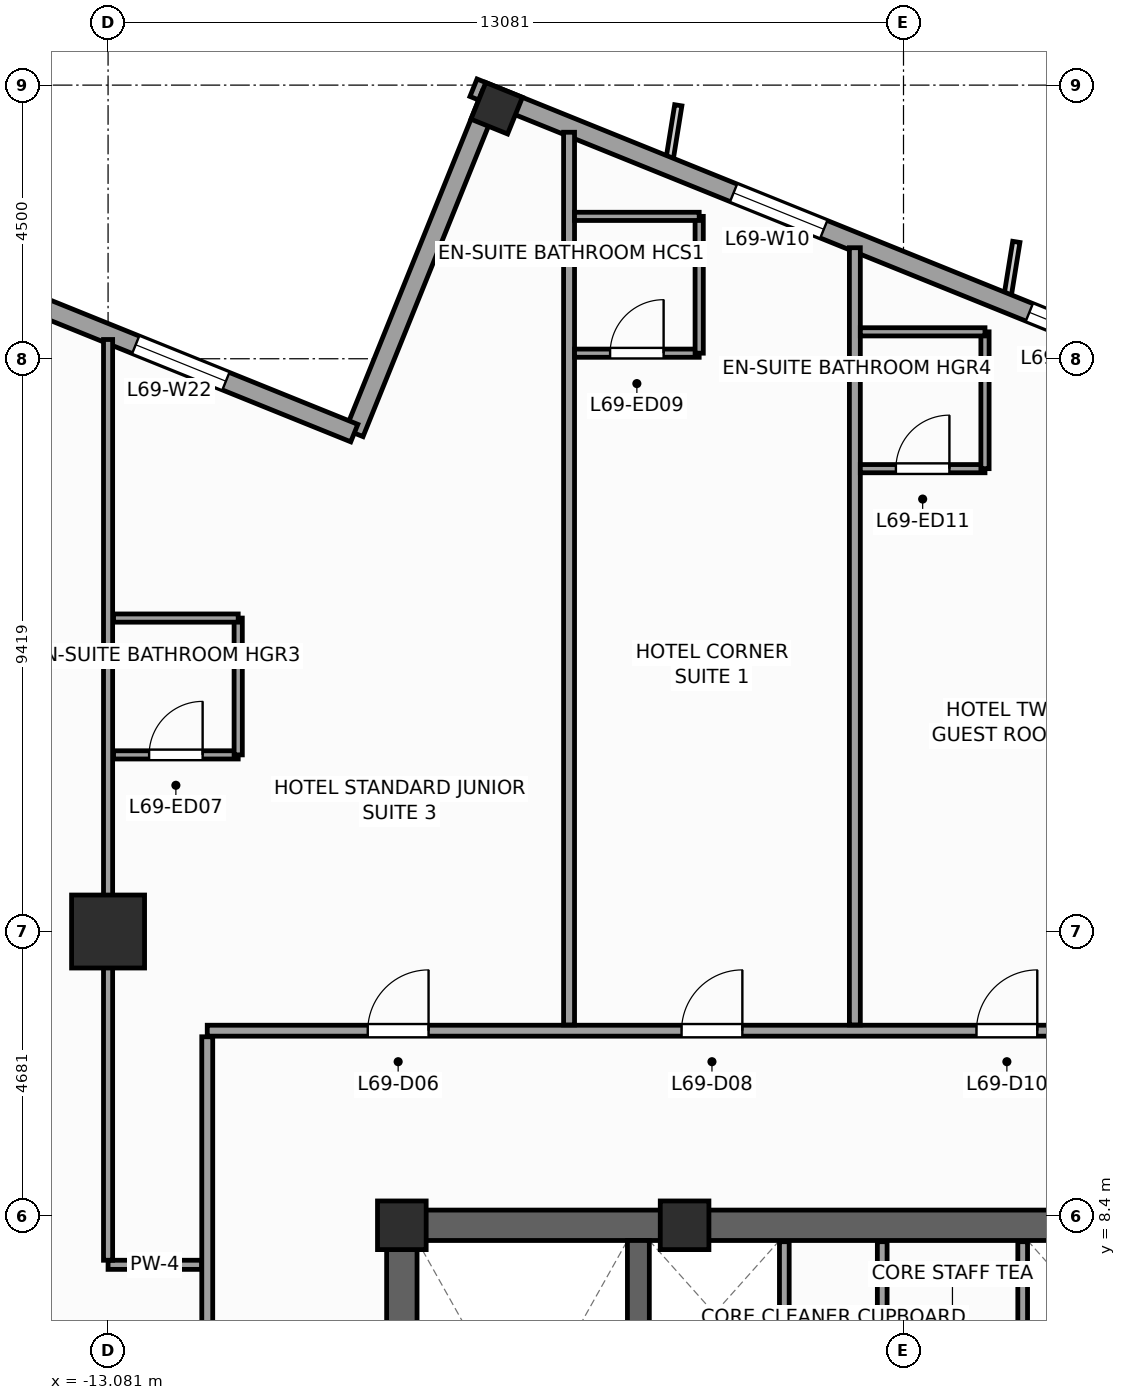
"""IFC4 building model, lengths in metres.
Left out: names, types, materials, properties, quantities, classifications, styles, units other than length and angle.
Written with IfcOpenShell. Run it as: python <this file> out.ifc"""

import sys

from ifc_helpers import new_model, si_unit, direction, frame, frame_2d, origin, origin_2d, place, context, subcontext, project, spatial, rectangle, extrude, source, transform, mapped, element, fill, save


model = new_model("IFC4")
c1 = context("Model", 3, precision=1e-05, world=origin(), true_north=direction((0.0, 1.0)))
c2 = subcontext(c1, "Body", "Model", "MODEL_VIEW")
j1 = project(units=[si_unit("LENGTHUNIT", "METRE"), si_unit("PLANEANGLEUNIT", "RADIAN")], contexts=[c1])
p1 = place(None, origin())
s1 = spatial("IfcSite", under=j1, at=p1, CompositionType="ELEMENT")
p2 = place(p1, origin())
s2 = spatial("IfcBuilding", under=s1, at=p2, CompositionType="ELEMENT")
p3 = place(p2, frame((0.0, 0.0, 283.2)))
s3 = spatial("IfcBuildingStorey", under=s2, at=p3, CompositionType="ELEMENT", Elevation=283.2)
p4 = place(p3, frame((-8.5, 8.25, 0.0), z_axis=(0.0, 0.0, 1.0), x_axis=(1.0, 0.0, 0.0)))
e1 = element("IfcWall", 1, at=p4, inside=s3, PredefinedType="SHEAR", context=c2, shape_type="SweptSolid", body=[
    extrude(rectangle(XDim=17.0, YDim=0.5, at=frame_2d((8.5, 0.0))), origin(), (0.0, 0.0, 1.0), 3.6),
])
p5 = place(p3, frame((-8.25, -8.0, 0.0), z_axis=(0.0, 0.0, 1.0), x_axis=(0.0, 1.0, 0.0)))
e2 = element("IfcWall", 2, at=p5, inside=s3, PredefinedType="SHEAR", context=c2, shape_type="SweptSolid", body=[
    extrude(rectangle(XDim=16.0, YDim=0.5, at=frame_2d((8.0, 0.0))), origin(), (0.0, 0.0, 1.0), 3.6),
])
p6 = place(p5, frame((4.69, 0.0, 0.0)))
e3 = element("IfcOpeningElement", 3, at=p6, cuts=e2, PredefinedType="OPENING", context=c2, shape_type="SweptSolid", body=[
    extrude(rectangle(XDim=1.3, YDim=2.2, at=frame_2d((0.65, 1.1))), frame((0.0, 0.26, 0.0), z_axis=(0.0, -1.0, 0.0), x_axis=(1.0, 0.0, 0.0)), (0.0, 0.0, 1.0), 0.52),
])
p7 = place(p3, frame((-4.36, -8.0, 0.0), z_axis=(0.0, 0.0, 1.0), x_axis=(0.0, 1.0, 0.0)))
e4 = element("IfcWall", 4, at=p7, inside=s3, PredefinedType="SHEAR", context=c2, shape_type="SweptSolid", body=[
    extrude(rectangle(XDim=16.0, YDim=0.36, at=frame_2d((8.0, 0.0))), origin(), (0.0, 0.0, 1.0), 3.6),
])
m1 = source(origin(), c2, "Body", "SweptSolid", [
    extrude(rectangle(XDim=0.8, YDim=0.8, at=origin_2d()), origin(), (0.0, 0.0, 1.0), 3.6),
])
for number, where, z_axis, x_axis in (
    (5, (-8.25, 8.25, 0.0), (0.0, 0.0, 1.0), (1.0, 0.0, 0.0)),
    (6, (-3.6, 8.25, 0.0), (0.0, 0.0, 1.0), (1.0, 0.0, 0.0)),
):
    element("IfcColumn", number, at=place(p3, frame(where, z_axis=z_axis, x_axis=x_axis)), inside=s3, PredefinedType="PILASTER", context=c2, shape_type="MappedRepresentation", body=[
        mapped(m1, transform((0.0, 0.0, 0.0), scale=1.0)),
    ])
m2 = source(origin(), c2, "Body", "SweptSolid", [
    extrude(rectangle(XDim=1.2, YDim=1.2, at=origin_2d()), origin(), (0.0, 0.0, 1.0), 3.6),
])
p8 = place(p3, frame((-13.081, 13.081, 0.0), z_axis=(0.0, 0.0, 1.0), x_axis=(1.0, 0.0, 0.0)))
e7 = element("IfcColumn", 7, at=p8, inside=s3, PredefinedType="COLUMN", context=c2, shape_type="MappedRepresentation", body=[
    mapped(m2, transform((0.0, 0.0, 0.0), scale=1.0)),
])
m3 = source(origin(), c2, "Body", "SweptSolid", [
    extrude(rectangle(XDim=0.65, YDim=0.65, at=origin_2d()), origin(), (0.0, 0.0, 1.0), 3.6),
])
p9 = place(p3, frame((-6.69, 26.62, 0.0), z_axis=(0.0, 0.0, 1.0), x_axis=(0.374606593416, 0.927183854567, 0.0)))
e8 = element("IfcColumn", 8, at=p9, inside=s3, PredefinedType="COLUMN", context=c2, shape_type="MappedRepresentation", body=[
    mapped(m3, transform((0.0, 0.0, 0.0), scale=1.0)),
])
p10 = place(p3, frame((23.813, 14.479, 0.0), z_axis=(0.0, 0.0, 1.0), x_axis=(-0.927182657188, 0.374609557019, 0.0)))
e9 = element("IfcWall", 9, at=p10, inside=s3, PredefinedType="STANDARD", context=c2, shape_type="SweptSolid", body=[
    extrude(rectangle(XDim=33.31, YDim=0.31, at=frame_2d((16.655, 0.0))), origin(), (0.0, 0.0, 1.0), 2.75),
])
p11 = place(p10, frame((3.197, 0.0, 0.47)))
e10 = element("IfcOpeningElement", 10, at=p11, cuts=e9, PredefinedType="OPENING", context=c2, shape_type="SweptSolid", body=[
    extrude(rectangle(XDim=1.6, YDim=2.1, at=frame_2d((0.8, 1.05))), frame((0.0, 0.165, 0.0), z_axis=(0.0, -1.0, 0.0), x_axis=(1.0, 0.0, 0.0)), (0.0, 0.0, 1.0), 0.33),
])
p12 = place(p10, frame((8.86, 0.0, 0.47)))
e11 = element("IfcOpeningElement", 11, at=p12, cuts=e9, PredefinedType="OPENING", context=c2, shape_type="SweptSolid", body=[
    extrude(rectangle(XDim=1.6, YDim=2.1, at=frame_2d((0.8, 1.05))), frame((0.0, 0.165, 0.0), z_axis=(0.0, -1.0, 0.0), x_axis=(1.0, 0.0, 0.0)), (0.0, 0.0, 1.0), 0.33),
])
p13 = place(p10, frame((14.439, 0.0, 0.47)))
e12 = element("IfcOpeningElement", 12, at=p13, cuts=e9, PredefinedType="OPENING", context=c2, shape_type="SweptSolid", body=[
    extrude(rectangle(XDim=1.6, YDim=2.1, at=frame_2d((0.8, 1.05))), frame((0.0, 0.165, 0.0), z_axis=(0.0, -1.0, 0.0), x_axis=(1.0, 0.0, 0.0)), (0.0, 0.0, 1.0), 0.33),
])
p14 = place(p10, frame((21.851, 0.0, 0.47)))
e13 = element("IfcOpeningElement", 13, at=p14, cuts=e9, PredefinedType="OPENING", context=c2, shape_type="SweptSolid", body=[
    extrude(rectangle(XDim=1.6, YDim=2.1, at=frame_2d((0.8, 1.05))), frame((0.0, 0.165, 0.0), z_axis=(0.0, -1.0, 0.0), x_axis=(1.0, 0.0, 0.0)), (0.0, 0.0, 1.0), 0.33),
])
p15 = place(p10, frame((27.097, 0.0, 0.47)))
e14 = element("IfcOpeningElement", 14, at=p15, cuts=e9, PredefinedType="OPENING", context=c2, shape_type="SweptSolid", body=[
    extrude(rectangle(XDim=1.6, YDim=2.1, at=frame_2d((0.8, 1.05))), frame((0.0, 0.165, 0.0), z_axis=(0.0, -1.0, 0.0), x_axis=(1.0, 0.0, 0.0)), (0.0, 0.0, 1.0), 0.33),
])
p16 = place(p3, frame((-6.784, 26.841, 0.0), z_axis=(0.0, 0.0, 1.0), x_axis=(-0.374636620962, -0.927171722085, 0.0)))
e15 = element("IfcWall", 15, at=p16, inside=s3, PredefinedType="STANDARD", context=c2, shape_type="SweptSolid", body=[
    extrude(rectangle(XDim=6.0, YDim=0.31, at=frame_2d((3.0, 0.0))), origin(), (0.0, 0.0, 1.0), 2.65),
])
p17 = place(p3, frame((-9.032, 21.278, 0.0), z_axis=(0.0, 0.0, 1.0), x_axis=(-0.927185411764, 0.374602739196, 0.0)))
e16 = element("IfcWall", 16, at=p17, inside=s3, PredefinedType="STANDARD", context=c2, shape_type="SweptSolid", body=[
    extrude(rectangle(XDim=6.155, YDim=0.31, at=frame_2d((3.078, 0.0))), origin(), (0.0, 0.0, 1.0), 3.35),
])
p18 = place(p17, frame((2.278, 0.0, 0.47)))
e17 = element("IfcOpeningElement", 17, at=p18, cuts=e16, PredefinedType="OPENING", context=c2, shape_type="SweptSolid", body=[
    extrude(rectangle(XDim=1.6, YDim=2.1, at=frame_2d((0.8, 1.05))), frame((0.0, 0.165, 0.0), z_axis=(0.0, -1.0, 0.0), x_axis=(1.0, 0.0, 0.0)), (0.0, 0.0, 1.0), 0.33),
])
for number, where, z_axis, x_axis in (
    (18, (-1.96, 4.58, 0.0), (0.0, 0.0, 1.0), (0.0, 1.0, 0.0)),
    (19, (1.96, 4.58, 0.0), (0.0, 0.0, 1.0), (0.0, 1.0, 0.0)),
):
    element("IfcWall", number, at=place(p3, frame(where, z_axis=z_axis, x_axis=x_axis)), inside=s3, PredefinedType="PARTITIONING", context=c2, shape_type="SweptSolid", body=[
        extrude(rectangle(XDim=3.4, YDim=0.16, at=frame_2d((1.7, 0.0))), origin(), (0.0, 0.0, 1.0), 3.35),
    ])
p19 = place(p3, frame((-0.35, 4.6, 0.0), z_axis=(0.0, 0.0, 1.0), x_axis=(0.0, 1.0, 0.0)))
e20 = element("IfcWall", 20, at=p19, inside=s3, PredefinedType="PARTITIONING", context=c2, shape_type="SweptSolid", body=[
    extrude(rectangle(XDim=3.38, YDim=0.16, at=frame_2d((1.69, 0.0))), origin(), (0.0, 0.0, 1.0), 3.35),
])
p20 = place(p3, frame((-11.45, 11.45, 0.0), z_axis=(0.0, 0.0, 1.0), x_axis=(1.0, 0.0, 0.0)))
e21 = element("IfcWall", 21, at=p20, inside=s3, PredefinedType="PARTITIONING", context=c2, shape_type="SweptSolid", body=[
    extrude(rectangle(XDim=21.75, YDim=0.18, at=frame_2d((10.875, 0.0))), origin(), (0.0, 0.0, 1.0), 3.35),
])
p21 = place(p20, frame((2.639, 0.0, 0.0)))
e22 = element("IfcOpeningElement", 22, at=p21, cuts=e21, PredefinedType="OPENING", context=c2, shape_type="SweptSolid", body=[
    extrude(rectangle(XDim=1.0, YDim=2.15, at=frame_2d((0.5, 1.075))), frame((0.0, 0.1, 0.0), z_axis=(0.0, -1.0, 0.0), x_axis=(1.0, 0.0, 0.0)), (0.0, 0.0, 1.0), 0.2),
])
p22 = place(p20, frame((7.8, 0.0, 0.0)))
e23 = element("IfcOpeningElement", 23, at=p22, cuts=e21, PredefinedType="OPENING", context=c2, shape_type="SweptSolid", body=[
    extrude(rectangle(XDim=1.0, YDim=2.15, at=frame_2d((0.5, 1.075))), frame((0.0, 0.1, 0.0), z_axis=(0.0, -1.0, 0.0), x_axis=(1.0, 0.0, 0.0)), (0.0, 0.0, 1.0), 0.2),
])
p23 = place(p20, frame((12.65, 0.0, 0.0)))
e24 = element("IfcOpeningElement", 24, at=p23, cuts=e21, PredefinedType="OPENING", context=c2, shape_type="SweptSolid", body=[
    extrude(rectangle(XDim=1.0, YDim=2.15, at=frame_2d((0.5, 1.075))), frame((0.0, 0.1, 0.0), z_axis=(0.0, -1.0, 0.0), x_axis=(1.0, 0.0, 0.0)), (0.0, 0.0, 1.0), 0.2),
])
p24 = place(p20, frame((18.036, 0.0, 0.0)))
e25 = element("IfcOpeningElement", 25, at=p24, cuts=e21, PredefinedType="OPENING", context=c2, shape_type="SweptSolid", body=[
    extrude(rectangle(XDim=1.0, YDim=2.15, at=frame_2d((0.5, 1.075))), frame((0.0, 0.1, 0.0), z_axis=(0.0, -1.0, 0.0), x_axis=(1.0, 0.0, 0.0)), (0.0, 0.0, 1.0), 0.2),
])
p25 = place(p3, frame((-11.45, -12.35, 0.0), z_axis=(0.0, 0.0, 1.0), x_axis=(0.0, 1.0, 0.0)))
e26 = element("IfcWall", 26, at=p25, inside=s3, PredefinedType="PARTITIONING", context=c2, shape_type="SweptSolid", body=[
    extrude(rectangle(XDim=23.7, YDim=0.18, at=frame_2d((11.85, 0.0))), origin(), (0.0, 0.0, 1.0), 3.35),
])
p26 = place(p25, frame((13.75, 0.0, 0.0)))
e27 = element("IfcOpeningElement", 27, at=p26, cuts=e26, PredefinedType="OPENING", context=c2, shape_type="SweptSolid", body=[
    extrude(rectangle(XDim=1.0, YDim=2.15, at=frame_2d((0.5, 1.075))), frame((0.0, 0.1, 0.0), z_axis=(0.0, -1.0, 0.0), x_axis=(1.0, 0.0, 0.0)), (0.0, 0.0, 1.0), 0.2),
])
p27 = place(p25, frame((17.55, 0.0, 0.0)))
e28 = element("IfcOpeningElement", 28, at=p27, cuts=e26, PredefinedType="OPENING", context=c2, shape_type="SweptSolid", body=[
    extrude(rectangle(XDim=1.0, YDim=2.15, at=frame_2d((0.5, 1.075))), frame((0.0, 0.1, 0.0), z_axis=(0.0, -1.0, 0.0), x_axis=(1.0, 0.0, 0.0)), (0.0, 0.0, 1.0), 0.2),
])
p28 = place(p25, frame((6.15, 0.0, 0.0)))
e29 = element("IfcOpeningElement", 29, at=p28, cuts=e26, PredefinedType="OPENING", context=c2, shape_type="SweptSolid", body=[
    extrude(rectangle(XDim=1.0, YDim=2.15, at=frame_2d((0.5, 1.075))), frame((0.0, 0.1, 0.0), z_axis=(0.0, -1.0, 0.0), x_axis=(1.0, 0.0, 0.0)), (0.0, 0.0, 1.0), 0.2),
])
p29 = place(p25, frame((9.95, 0.0, 0.0)))
e30 = element("IfcOpeningElement", 30, at=p29, cuts=e26, PredefinedType="OPENING", context=c2, shape_type="SweptSolid", body=[
    extrude(rectangle(XDim=1.0, YDim=2.15, at=frame_2d((0.5, 1.075))), frame((0.0, 0.1, 0.0), z_axis=(0.0, -1.0, 0.0), x_axis=(1.0, 0.0, 0.0)), (0.0, 0.0, 1.0), 0.2),
])
p30 = place(p3, frame((-5.5, 11.545, 0.0), z_axis=(0.0, 0.0, 1.0), x_axis=(0.0, 1.0, 0.0)))
e31 = element("IfcWall", 31, at=p30, inside=s3, PredefinedType="PARTITIONING", context=c2, shape_type="SweptSolid", body=[
    extrude(rectangle(XDim=14.68, YDim=0.18, at=frame_2d((7.34, 0.0))), origin(), (0.0, 0.0, 1.0), 3.35),
])
p31 = place(p3, frame((-0.8, 11.545, 0.0), z_axis=(0.0, 0.0, 1.0), x_axis=(0.0, 1.0, 0.0)))
e32 = element("IfcWall", 32, at=p31, inside=s3, PredefinedType="PARTITIONING", context=c2, shape_type="SweptSolid", body=[
    extrude(rectangle(XDim=12.781, YDim=0.18, at=frame_2d((6.391, 0.0))), origin(), (0.0, 0.0, 1.0), 3.02),
])
p32 = place(p3, frame((-11.545, 7.6, 0.0), z_axis=(0.0, 0.0, 1.0), x_axis=(-1.0, 0.0, 0.0)))
e33 = element("IfcWall", 33, at=p32, inside=s3, PredefinedType="PARTITIONING", context=c2, shape_type="SweptSolid", body=[
    extrude(rectangle(XDim=1.536, YDim=0.15, at=frame_2d((0.768, 0.0))), origin(), (0.0, 0.0, 1.0), 3.35),
])
p33 = place(p3, frame((-13.081, 7.675, 0.0), z_axis=(0.0, 0.0, 1.0), x_axis=(0.0, 1.0, 0.0)))
e34 = element("IfcWall", 34, at=p33, inside=s3, PredefinedType="PARTITIONING", context=c2, shape_type="SweptSolid", body=[
    extrude(rectangle(XDim=15.142, YDim=0.15, at=frame_2d((7.571, 0.0))), origin(), (0.0, 0.0, 1.0), 2.45),
])
p34 = place(p3, frame((-12.991, 15.986, 0.0), z_axis=(0.0, 0.0, 1.0), x_axis=(1.0, 0.0, 0.0)))
e35 = element("IfcWall", 35, at=p34, inside=s3, PredefinedType="PARTITIONING", context=c2, shape_type="SweptSolid", body=[
    extrude(rectangle(XDim=2.05, YDim=0.135, at=frame_2d((1.025, 0.0))), origin(), (0.0, 0.0, 1.0), 3.35),
])
p35 = place(p34, frame((0.585, 0.0, 0.0)))
e36 = element("IfcOpeningElement", 36, at=p35, cuts=e35, PredefinedType="OPENING", context=c2, shape_type="SweptSolid", body=[
    extrude(rectangle(XDim=0.88, YDim=2.1, at=frame_2d((0.44, 1.05))), frame((0.0, 0.078, 0.0), z_axis=(0.0, -1.0, 0.0), x_axis=(1.0, 0.0, 0.0)), (0.0, 0.0, 1.0), 0.155),
])
p36 = place(p3, frame((-10.941, 15.986, 0.0), z_axis=(0.0, 0.0, 1.0), x_axis=(0.0, 1.0, 0.0)))
e37 = element("IfcWall", 37, at=p36, inside=s3, PredefinedType="PARTITIONING", context=c2, shape_type="SweptSolid", body=[
    extrude(rectangle(XDim=2.25, YDim=0.135, at=frame_2d((1.125, 0.0))), origin(), (0.0, 0.0, 1.0), 3.35),
])
p37 = place(p3, frame((-12.991, 18.236, 0.0), z_axis=(0.0, 0.0, 1.0), x_axis=(1.0, 0.0, 0.0)))
e38 = element("IfcWall", 38, at=p37, inside=s3, PredefinedType="PARTITIONING", context=c2, shape_type="SweptSolid", body=[
    extrude(rectangle(XDim=2.05, YDim=0.135, at=frame_2d((1.025, 0.0))), origin(), (0.0, 0.0, 1.0), 3.35),
])
p38 = place(p3, frame((-5.41, 22.592, 0.0), z_axis=(0.0, 0.0, 1.0), x_axis=(1.0, 0.0, 0.0)))
e39 = element("IfcWall", 39, at=p38, inside=s3, PredefinedType="PARTITIONING", context=c2, shape_type="SweptSolid", body=[
    extrude(rectangle(XDim=2.05, YDim=0.135, at=frame_2d((1.025, 0.0))), origin(), (0.0, 0.0, 1.0), 3.35),
])
p39 = place(p38, frame((0.585, 0.0, 0.0)))
e40 = element("IfcOpeningElement", 40, at=p39, cuts=e39, PredefinedType="OPENING", context=c2, shape_type="SweptSolid", body=[
    extrude(rectangle(XDim=0.88, YDim=2.1, at=frame_2d((0.44, 1.05))), frame((0.0, 0.078, 0.0), z_axis=(0.0, -1.0, 0.0), x_axis=(1.0, 0.0, 0.0)), (0.0, 0.0, 1.0), 0.155),
])
p40 = place(p3, frame((-3.36, 22.592, 0.0), z_axis=(0.0, 0.0, 1.0), x_axis=(0.0, 1.0, 0.0)))
e41 = element("IfcWall", 41, at=p40, inside=s3, PredefinedType="PARTITIONING", context=c2, shape_type="SweptSolid", body=[
    extrude(rectangle(XDim=2.25, YDim=0.135, at=frame_2d((1.125, 0.0))), origin(), (0.0, 0.0, 1.0), 3.35),
])
p41 = place(p3, frame((-5.41, 24.842, 0.0), z_axis=(0.0, 0.0, 1.0), x_axis=(1.0, 0.0, 0.0)))
e42 = element("IfcWall", 42, at=p41, inside=s3, PredefinedType="PARTITIONING", context=c2, shape_type="SweptSolid", body=[
    extrude(rectangle(XDim=2.05, YDim=0.135, at=frame_2d((1.025, 0.0))), origin(), (0.0, 0.0, 1.0), 3.35),
])
p42 = place(p3, frame((-0.71, 20.693, 0.0), z_axis=(0.0, 0.0, 1.0), x_axis=(1.0, 0.0, 0.0)))
e43 = element("IfcWall", 43, at=p42, inside=s3, PredefinedType="PARTITIONING", context=c2, shape_type="SweptSolid", body=[
    extrude(rectangle(XDim=2.05, YDim=0.135, at=frame_2d((1.025, 0.0))), origin(), (0.0, 0.0, 1.0), 3.35),
])
p43 = place(p42, frame((0.585, 0.0, 0.0)))
e44 = element("IfcOpeningElement", 44, at=p43, cuts=e43, PredefinedType="OPENING", context=c2, shape_type="SweptSolid", body=[
    extrude(rectangle(XDim=0.88, YDim=2.1, at=frame_2d((0.44, 1.05))), frame((0.0, 0.078, 0.0), z_axis=(0.0, -1.0, 0.0), x_axis=(1.0, 0.0, 0.0)), (0.0, 0.0, 1.0), 0.155),
])
p44 = place(p3, frame((1.34, 20.693, 0.0), z_axis=(0.0, 0.0, 1.0), x_axis=(0.0, 1.0, 0.0)))
e45 = element("IfcWall", 45, at=p44, inside=s3, PredefinedType="PARTITIONING", context=c2, shape_type="SweptSolid", body=[
    extrude(rectangle(XDim=2.25, YDim=0.135, at=frame_2d((1.125, 0.0))), origin(), (0.0, 0.0, 1.0), 3.35),
])
p45 = place(p3, frame((-0.71, 22.943, 0.0), z_axis=(0.0, 0.0, 1.0), x_axis=(1.0, 0.0, 0.0)))
e46 = element("IfcWall", 46, at=p45, inside=s3, PredefinedType="PARTITIONING", context=c2, shape_type="SweptSolid", body=[
    extrude(rectangle(XDim=2.05, YDim=0.135, at=frame_2d((1.025, 0.0))), origin(), (0.0, 0.0, 1.0), 3.35),
])
m4 = source(origin(), c2, "Body", "SweptSolid", [
    extrude(rectangle(XDim=1.6, YDim=2.1, at=frame_2d((0.8, 1.05))), frame((0.0, 0.03, 0.0), z_axis=(0.0, -1.0, 0.0), x_axis=(1.0, 0.0, 0.0)), (0.0, 0.0, 1.0), 0.06),
])
p46 = place(p14, origin())
e47 = element("IfcWindow", 47, at=p46, inside=s3, PartitioningType="SINGLE_PANEL", PredefinedType="WINDOW", context=c2, shape_type="MappedRepresentation", body=[
    mapped(m4, transform((0.0, 0.0, 0.0), scale=1.0)),
])
fill(e13, e47)
p47 = place(p15, origin())
e48 = element("IfcWindow", 48, at=p47, inside=s3, PartitioningType="SINGLE_PANEL", PredefinedType="WINDOW", context=c2, shape_type="MappedRepresentation", body=[
    mapped(m4, transform((0.0, 0.0, 0.0), scale=1.0)),
])
fill(e14, e48)
p48 = place(p18, origin())
e49 = element("IfcWindow", 49, at=p48, inside=s3, PartitioningType="SINGLE_PANEL", PredefinedType="WINDOW", context=c2, shape_type="MappedRepresentation", body=[
    mapped(m4, transform((0.0, 0.0, 0.0), scale=1.0)),
])
fill(e17, e49)
m5 = source(origin(), c2, "Body", "SweptSolid", [
    extrude(rectangle(XDim=1.0, YDim=2.15, at=frame_2d((0.5, 1.075))), frame((0.0, 0.025, 0.0), z_axis=(0.0, -1.0, 0.0), x_axis=(1.0, 0.0, 0.0)), (0.0, 0.0, 1.0), 0.05),
])
p49 = place(p21, origin())
e50 = element("IfcDoor", 50, at=p49, inside=s3, OperationType="SINGLE_SWING_RIGHT", PredefinedType="DOOR", context=c2, shape_type="MappedRepresentation", body=[
    mapped(m5, transform((0.0, 0.0, 0.0), scale=1.0)),
])
fill(e22, e50)
m6 = source(origin(), c2, "Body", "SweptSolid", [
    extrude(rectangle(XDim=0.88, YDim=2.1, at=frame_2d((0.44, 1.05))), frame((0.0, 0.025, 0.0), z_axis=(0.0, -1.0, 0.0), x_axis=(1.0, 0.0, 0.0)), (0.0, 0.0, 1.0), 0.05),
])
p50 = place(p35, origin())
e51 = element("IfcDoor", 51, at=p50, inside=s3, OperationType="SINGLE_SWING_RIGHT", PredefinedType="DOOR", context=c2, shape_type="MappedRepresentation", body=[
    mapped(m6, transform((0.0, 0.0, 0.0), scale=1.0)),
])
fill(e36, e51)
p51 = place(p22, origin())
e52 = element("IfcDoor", 52, at=p51, inside=s3, OperationType="SINGLE_SWING_RIGHT", PredefinedType="DOOR", context=c2, shape_type="MappedRepresentation", body=[
    mapped(m5, transform((0.0, 0.0, 0.0), scale=1.0)),
])
fill(e23, e52)
p52 = place(p39, origin())
e53 = element("IfcDoor", 53, at=p52, inside=s3, OperationType="SINGLE_SWING_RIGHT", PredefinedType="DOOR", context=c2, shape_type="MappedRepresentation", body=[
    mapped(m6, transform((0.0, 0.0, 0.0), scale=1.0)),
])
fill(e40, e53)
p53 = place(p23, origin())
e54 = element("IfcDoor", 54, at=p53, inside=s3, OperationType="SINGLE_SWING_RIGHT", PredefinedType="DOOR", context=c2, shape_type="MappedRepresentation", body=[
    mapped(m5, transform((0.0, 0.0, 0.0), scale=1.0)),
])
fill(e24, e54)
p54 = place(p43, origin())
e55 = element("IfcDoor", 55, at=p54, inside=s3, OperationType="SINGLE_SWING_RIGHT", PredefinedType="DOOR", context=c2, shape_type="MappedRepresentation", body=[
    mapped(m6, transform((0.0, 0.0, 0.0), scale=1.0)),
])
fill(e44, e55)
save(model, sys.argv[1])
